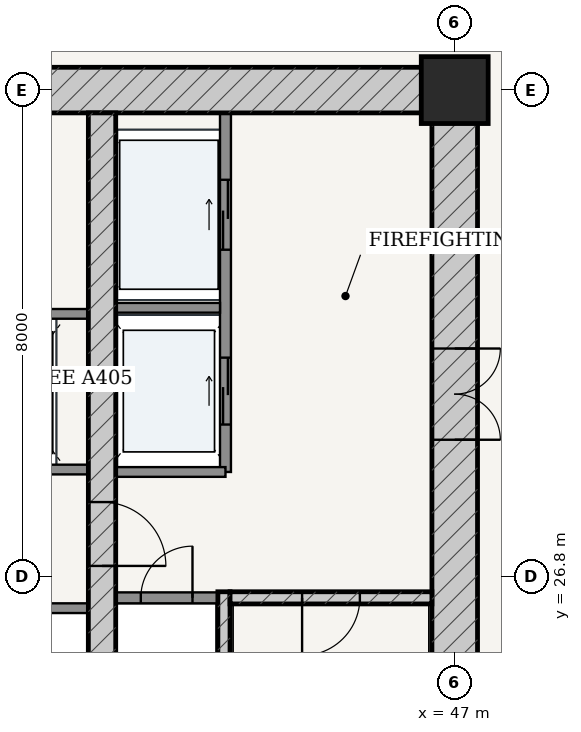
"""IFC4 building model, lengths in metres.
Left out: names, types, materials, properties, quantities, classifications, styles, units other than length and angle.
Written with IfcOpenShell. Run it as: python <this file> out.ifc"""

import sys

from ifc_helpers import new_model, si_unit, direction, frame, frame_2d, origin, origin_2d, place, context, subcontext, project, spatial, rectangle, extrude, source, transform, mapped, element, fill, save


model = new_model("IFC4")
c1 = context("Model", 3, precision=1e-05, world=origin(), true_north=direction((-0.2419218956, 0.970295726276)))
c2 = subcontext(c1, "Body", "Model", "MODEL_VIEW")
j1 = project(units=[si_unit("LENGTHUNIT", "METRE"), si_unit("PLANEANGLEUNIT", "RADIAN")], contexts=[c1])
p1 = place(None, origin())
s1 = spatial("IfcSite", under=j1, at=p1, CompositionType="ELEMENT")
p2 = place(p1, origin())
s2 = spatial("IfcBuilding", under=s1, at=p2, CompositionType="ELEMENT")
p3 = place(p2, frame((0.0, 0.0, 9.9)))
s3 = spatial("IfcBuildingStorey", under=s2, at=p3, CompositionType="ELEMENT", Elevation=9.9)
p4 = place(p3, frame((47.0, 34.8, 0.0), z_axis=(0.0, 0.0, 1.0), x_axis=(1.0, 0.0, 0.0)))
e1 = element("IfcColumn", 1, at=p4, inside=s3, PredefinedType="COLUMN", context=c2, shape_type="SweptSolid", body=[
    extrude(rectangle(XDim=1.1, YDim=1.1, at=origin_2d()), origin(), (0.0, 0.0, 1.0), 4.5),
])
p5 = place(p3, frame((28.625, 34.8, 0.0), z_axis=(0.0, 0.0, 1.0), x_axis=(1.0, 0.0, 0.0)))
e2 = element("IfcWall", 2, at=p5, inside=s3, PredefinedType="SHEAR", context=c2, shape_type="SweptSolid", body=[
    extrude(rectangle(XDim=18.75, YDim=0.75, at=frame_2d((9.375, 0.0))), origin(), (0.0, 0.0, 1.0), 4.2),
])
p6 = place(p5, frame((7.407, 0.0, 0.0)))
e3 = element("IfcOpeningElement", 3, at=p6, cuts=e2, PredefinedType="OPENING", context=c2, shape_type="SweptSolid", body=[
    extrude(rectangle(XDim=0.86, YDim=2.1, at=frame_2d((0.43, 1.05))), frame((0.0, 0.385, 0.0), z_axis=(0.0, -1.0, 0.0), x_axis=(1.0, 0.0, 0.0)), (0.0, 0.0, 1.0), 0.77),
])
p7 = place(p5, frame((10.488, 0.0, 0.0)))
e4 = element("IfcOpeningElement", 4, at=p7, cuts=e2, PredefinedType="OPENING", context=c2, shape_type="SweptSolid", body=[
    extrude(rectangle(XDim=0.85, YDim=2.1, at=frame_2d((0.425, 1.05))), frame((0.0, 0.385, 0.0), z_axis=(0.0, -1.0, 0.0), x_axis=(1.0, 0.0, 0.0)), (0.0, 0.0, 1.0), 0.77),
])
p8 = place(p3, frame((47.0, 19.175, 0.0), z_axis=(0.0, 0.0, 1.0), x_axis=(0.0, 1.0, 0.0)))
e5 = element("IfcWall", 5, at=p8, inside=s3, PredefinedType="SHEAR", context=c2, shape_type="SweptSolid", body=[
    extrude(rectangle(XDim=15.25, YDim=0.75, at=frame_2d((7.625, 0.0))), origin(), (0.0, 0.0, 1.0), 4.2),
])
p9 = place(p8, frame((9.875, 0.0, 0.0)))
e6 = element("IfcOpeningElement", 6, at=p9, cuts=e5, PredefinedType="OPENING", context=c2, shape_type="SweptSolid", body=[
    extrude(rectangle(XDim=1.5, YDim=2.2, at=frame_2d((0.75, 1.1))), frame((0.0, 0.385, 0.0), z_axis=(0.0, -1.0, 0.0), x_axis=(1.0, 0.0, 0.0)), (0.0, 0.0, 1.0), 0.77),
])
p10 = place(p3, frame((43.205, 19.175, 0.0), z_axis=(0.0, 0.0, 1.0), x_axis=(0.0, 1.0, 0.0)))
e7 = element("IfcWall", 7, at=p10, inside=s3, PredefinedType="SOLIDWALL", context=c2, shape_type="SweptSolid", body=[
    extrude(rectangle(XDim=7.375, YDim=0.2, at=frame_2d((3.688, 0.0))), origin(), (0.0, 0.0, 1.0), 4.2),
])
p11 = place(p3, frame((43.305, 26.45, 0.0), z_axis=(0.0, 0.0, 1.0), x_axis=(1.0, 0.0, 0.0)))
e8 = element("IfcWall", 8, at=p11, inside=s3, PredefinedType="SOLIDWALL", context=c2, shape_type="SweptSolid", body=[
    extrude(rectangle(XDim=3.32, YDim=0.2, at=frame_2d((1.66, 0.0))), origin(), (0.0, 0.0, 1.0), 4.2),
])
p12 = place(p11, frame((1.185, 0.0, 0.0)))
e9 = element("IfcOpeningElement", 9, at=p12, cuts=e8, PredefinedType="OPENING", context=c2, shape_type="SweptSolid", body=[
    extrude(rectangle(XDim=0.95, YDim=2.15, at=frame_2d((0.475, 1.075))), frame((0.0, 0.11, 0.0), z_axis=(0.0, -1.0, 0.0), x_axis=(1.0, 0.0, 0.0)), (0.0, 0.0, 1.0), 0.22),
])
p13 = place(p3, frame((41.2, 19.175, 0.0), z_axis=(0.0, 0.0, 1.0), x_axis=(0.0, 1.0, 0.0)))
e10 = element("IfcWall", 10, at=p13, inside=s3, PredefinedType="SHEAR", context=c2, shape_type="SweptSolid", body=[
    extrude(rectangle(XDim=15.25, YDim=0.45, at=frame_2d((7.625, 0.0))), origin(), (0.0, 0.0, 1.0), 4.2),
])
p14 = place(p13, frame((7.8, 0.0, 0.0)))
e11 = element("IfcOpeningElement", 11, at=p14, cuts=e10, PredefinedType="OPENING", context=c2, shape_type="SweptSolid", body=[
    extrude(rectangle(XDim=1.05, YDim=2.15, at=frame_2d((0.525, 1.075))), frame((0.0, 0.235, 0.0), z_axis=(0.0, -1.0, 0.0), x_axis=(1.0, 0.0, 0.0)), (0.0, 0.0, 1.0), 0.47),
])
p15 = place(p3, frame((41.425, 26.45, 0.0), z_axis=(0.0, 0.0, 1.0), x_axis=(1.0, 0.0, 0.0)))
e12 = element("IfcWall", 12, at=p15, inside=s3, PredefinedType="PARTITIONING", context=c2, shape_type="SweptSolid", body=[
    extrude(rectangle(XDim=1.675, YDim=0.18, at=frame_2d((0.837, 0.0))), origin(), (0.0, 0.0, 1.0), 4.2),
])
p16 = place(p15, frame((0.413, 0.0, 0.0)))
e13 = element("IfcOpeningElement", 13, at=p16, cuts=e12, PredefinedType="OPENING", context=c2, shape_type="SweptSolid", body=[
    extrude(rectangle(XDim=0.85, YDim=2.1, at=frame_2d((0.425, 1.05))), frame((0.0, 0.1, 0.0), z_axis=(0.0, -1.0, 0.0), x_axis=(1.0, 0.0, 0.0)), (0.0, 0.0, 1.0), 0.2),
])
p17 = place(p3, frame((43.23, 28.52, 0.0), z_axis=(0.0, 0.0, 1.0), x_axis=(0.0, 1.0, 0.0)))
e14 = element("IfcWall", 14, at=p17, inside=s3, PredefinedType="PARTITIONING", context=c2, shape_type="SweptSolid", body=[
    extrude(rectangle(XDim=5.905, YDim=0.18, at=frame_2d((2.953, 0.0))), origin(), (0.0, 0.0, 1.0), 4.2),
])
p18 = place(p17, frame((3.655, 0.0, 0.0)))
e15 = element("IfcOpeningElement", 15, at=p18, cuts=e14, PredefinedType="OPENING", context=c2, shape_type="SweptSolid", body=[
    extrude(rectangle(XDim=1.15, YDim=2.2, at=frame_2d((0.575, 1.1))), frame((0.0, 0.1, 0.0), z_axis=(0.0, -1.0, 0.0), x_axis=(1.0, 0.0, 0.0)), (0.0, 0.0, 1.0), 0.2),
])
p19 = place(p17, frame((0.78, 0.0, 0.0)))
e16 = element("IfcOpeningElement", 16, at=p19, cuts=e14, PredefinedType="OPENING", context=c2, shape_type="SweptSolid", body=[
    extrude(rectangle(XDim=1.1, YDim=2.2, at=frame_2d((0.55, 1.1))), frame((0.0, 0.1, 0.0), z_axis=(0.0, -1.0, 0.0), x_axis=(1.0, 0.0, 0.0)), (0.0, 0.0, 1.0), 0.2),
])
p20 = place(p3, frame((41.425, 31.22, 0.0), z_axis=(0.0, 0.0, 1.0), x_axis=(1.0, 0.0, 0.0)))
e17 = element("IfcWall", 17, at=p20, inside=s3, PredefinedType="PARTITIONING", context=c2, shape_type="SweptSolid", body=[
    extrude(rectangle(XDim=1.715, YDim=0.16, at=frame_2d((0.857, 0.0))), origin(), (0.0, 0.0, 1.0), 4.2),
])
p21 = place(p3, frame((41.425, 28.52, 0.0), z_axis=(0.0, 0.0, 1.0), x_axis=(1.0, 0.0, 0.0)))
e18 = element("IfcWall", 18, at=p21, inside=s3, PredefinedType="PARTITIONING", context=c2, shape_type="SweptSolid", body=[
    extrude(rectangle(XDim=1.805, YDim=0.16, at=frame_2d((0.902, 0.0))), origin(), (0.0, 0.0, 1.0), 4.2),
])
p22 = place(p3, frame((35.025, 28.56, 0.0), z_axis=(0.0, 0.0, 1.0), x_axis=(1.0, 0.0, 0.0)))
e19 = element("IfcWall", 19, at=p22, inside=s3, PredefinedType="PARTITIONING", context=c2, shape_type="SweptSolid", body=[
    extrude(rectangle(XDim=5.95, YDim=0.16, at=frame_2d((2.975, 0.0))), origin(), (0.0, 0.0, 1.0), 4.2),
])
p23 = place(p22, frame((0.76, 0.0, 0.0)))
e20 = element("IfcOpeningElement", 20, at=p23, cuts=e19, PredefinedType="OPENING", context=c2, shape_type="SweptSolid", body=[
    extrude(rectangle(XDim=1.1, YDim=2.2, at=frame_2d((0.55, 1.1))), frame((0.0, 0.09, 0.0), z_axis=(0.0, -1.0, 0.0), x_axis=(1.0, 0.0, 0.0)), (0.0, 0.0, 1.0), 0.18),
])
p24 = place(p22, frame((2.425, 0.0, 0.0)))
e21 = element("IfcOpeningElement", 21, at=p24, cuts=e19, PredefinedType="OPENING", context=c2, shape_type="SweptSolid", body=[
    extrude(rectangle(XDim=1.1, YDim=2.2, at=frame_2d((0.55, 1.1))), frame((0.0, 0.09, 0.0), z_axis=(0.0, -1.0, 0.0), x_axis=(1.0, 0.0, 0.0)), (0.0, 0.0, 1.0), 0.18),
])
p25 = place(p22, frame((4.09, 0.0, 0.0)))
e22 = element("IfcOpeningElement", 22, at=p25, cuts=e19, PredefinedType="OPENING", context=c2, shape_type="SweptSolid", body=[
    extrude(rectangle(XDim=1.1, YDim=2.2, at=frame_2d((0.55, 1.1))), frame((0.0, 0.09, 0.0), z_axis=(0.0, -1.0, 0.0), x_axis=(1.0, 0.0, 0.0)), (0.0, 0.0, 1.0), 0.18),
])
for number, where, z_axis, x_axis in (
    (23, (35.025, 31.12, 0.0), (0.0, 0.0, 1.0), (1.0, 0.0, 0.0)),
    (24, (35.025, 26.28, 0.0), (0.0, 0.0, 1.0), (1.0, 0.0, 0.0)),
):
    element("IfcWall", number, at=place(p3, frame(where, z_axis=z_axis, x_axis=x_axis)), inside=s3, PredefinedType="PARTITIONING", context=c2, shape_type="SweptSolid", body=[
        extrude(rectangle(XDim=5.95, YDim=0.16, at=frame_2d((2.975, 0.0))), origin(), (0.0, 0.0, 1.0), 4.2),
    ])
m1 = source(origin(), c2, "Body", "SweptSolid", [
    extrude(rectangle(XDim=1.5, YDim=2.2, at=frame_2d((0.75, 1.1))), frame((0.0, 0.025, 0.0), z_axis=(0.0, -1.0, 0.0), x_axis=(1.0, 0.0, 0.0)), (0.0, 0.0, 1.0), 0.05),
])
p26 = place(p9, frame((1.5, 0.0, 0.0), z_axis=(0.0, 0.0, 1.0), x_axis=(-1.0, 0.0, 0.0)))
e25 = element("IfcDoor", 25, at=p26, inside=s3, OperationType="DOUBLE_DOOR_SINGLE_SWING", PredefinedType="DOOR", context=c2, shape_type="MappedRepresentation", body=[
    mapped(m1, transform((0.0, 0.0, 0.0), scale=1.0)),
])
fill(e6, e25)
m2 = source(origin(), c2, "Body", "SweptSolid", [
    extrude(rectangle(XDim=1.05, YDim=2.15, at=frame_2d((0.525, 1.075))), frame((0.0, 0.025, 0.0), z_axis=(0.0, -1.0, 0.0), x_axis=(1.0, 0.0, 0.0)), (0.0, 0.0, 1.0), 0.05),
])
p27 = place(p14, frame((1.05, 0.0, 0.0), z_axis=(0.0, 0.0, 1.0), x_axis=(-1.0, 0.0, 0.0)))
e26 = element("IfcDoor", 26, at=p27, inside=s3, OperationType="SINGLE_SWING_RIGHT", PredefinedType="DOOR", context=c2, shape_type="MappedRepresentation", body=[
    mapped(m2, transform((0.0, 0.0, 0.0), scale=1.0)),
])
fill(e11, e26)
m3 = source(origin(), c2, "Body", "SweptSolid", [
    extrude(rectangle(XDim=0.95, YDim=2.15, at=frame_2d((0.475, 1.075))), frame((0.0, 0.025, 0.0), z_axis=(0.0, -1.0, 0.0), x_axis=(1.0, 0.0, 0.0)), (0.0, 0.0, 1.0), 0.05),
])
p28 = place(p12, frame((0.95, 0.0, 0.0), z_axis=(0.0, 0.0, 1.0), x_axis=(-1.0, 0.0, 0.0)))
e27 = element("IfcDoor", 27, at=p28, inside=s3, OperationType="SINGLE_SWING_RIGHT", PredefinedType="DOOR", context=c2, shape_type="MappedRepresentation", body=[
    mapped(m3, transform((0.0, 0.0, 0.0), scale=1.0)),
])
fill(e9, e27)
m4 = source(origin(), c2, "Body", "SweptSolid", [
    extrude(rectangle(XDim=0.85, YDim=2.1, at=frame_2d((0.425, 1.05))), frame((0.0, 0.025, 0.0), z_axis=(0.0, -1.0, 0.0), x_axis=(1.0, 0.0, 0.0)), (0.0, 0.0, 1.0), 0.05),
])
p29 = place(p16, origin())
e28 = element("IfcDoor", 28, at=p29, inside=s3, OperationType="SINGLE_SWING_RIGHT", PredefinedType="DOOR", context=c2, shape_type="MappedRepresentation", body=[
    mapped(m4, transform((0.0, 0.0, 0.0), scale=1.0)),
])
fill(e13, e28)
m5 = source(origin(), c2, "Body", "SweptSolid", [
    extrude(rectangle(XDim=1.15, YDim=2.2, at=frame_2d((0.575, 1.1))), frame((0.0, 0.025, 0.0), z_axis=(0.0, -1.0, 0.0), x_axis=(1.0, 0.0, 0.0)), (0.0, 0.0, 1.0), 0.05),
])
p30 = place(p18, origin())
e29 = element("IfcDoor", 29, at=p30, inside=s3, OperationType="DOUBLE_DOOR_SLIDING", PredefinedType="DOOR", context=c2, shape_type="MappedRepresentation", body=[
    mapped(m5, transform((0.0, 0.0, 0.0), scale=1.0)),
])
fill(e15, e29)
m6 = source(origin(), c2, "Body", "SweptSolid", [
    extrude(rectangle(XDim=1.1, YDim=2.2, at=frame_2d((0.55, 1.1))), frame((0.0, 0.025, 0.0), z_axis=(0.0, -1.0, 0.0), x_axis=(1.0, 0.0, 0.0)), (0.0, 0.0, 1.0), 0.05),
])
p31 = place(p19, origin())
e30 = element("IfcDoor", 30, at=p31, inside=s3, OperationType="DOUBLE_DOOR_SLIDING", PredefinedType="DOOR", context=c2, shape_type="MappedRepresentation", body=[
    mapped(m6, transform((0.0, 0.0, 0.0), scale=1.0)),
])
fill(e16, e30)
save(model, sys.argv[1])
